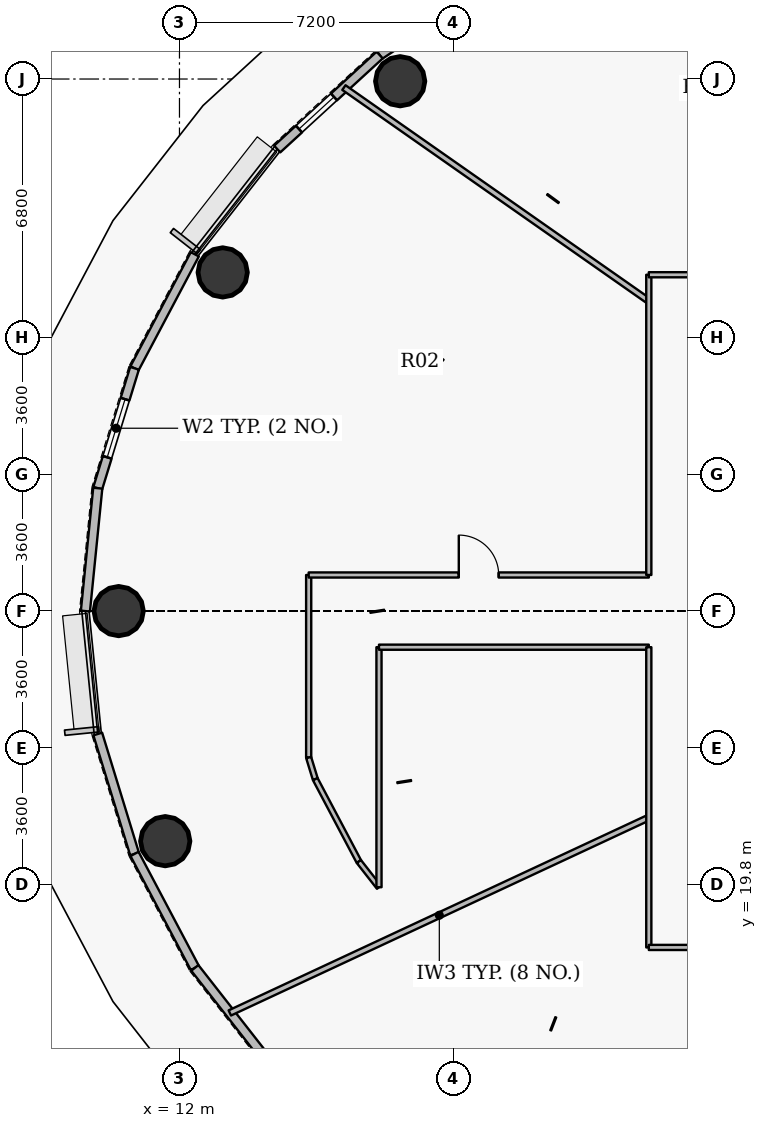
"""IFC4 building model, lengths in metres.
Left out: names, types, materials, properties, quantities, classifications, styles, units other than length and angle.
Written with IfcOpenShell. Run it as: python <this file> out.ifc"""

import sys

from ifc_helpers import new_model, si_unit, direction, frame, frame_2d, origin, origin_2d, place, context, subcontext, project, spatial, rectangle, hollow_circle, extrude, source, transform, mapped, element, fill, save


model = new_model("IFC4")
c1 = context("Model", 3, precision=1e-05, world=origin(), true_north=direction((0.0, 1.0)))
c2 = subcontext(c1, "Body", "Model", "MODEL_VIEW")
j1 = project(units=[si_unit("LENGTHUNIT", "METRE"), si_unit("PLANEANGLEUNIT", "RADIAN")], contexts=[c1])
p1 = place(None, origin())
s1 = spatial("IfcSite", under=j1, at=p1, CompositionType="ELEMENT")
p2 = place(p1, origin())
s2 = spatial("IfcBuilding", under=s1, at=p2, CompositionType="ELEMENT")
p3 = place(p2, frame((0.0, 0.0, 151.35)))
s3 = spatial("IfcBuildingStorey", under=s2, at=p3, CompositionType="ELEMENT", Elevation=151.35)
for number, where, z_axis, x_axis in (
    (1, (17.808, 40.942, -0.3), (0.0, 0.0, 1.0), (1.0, 0.0, 0.0)),
    (2, (13.137, 35.911, -0.3), (0.0, 0.0, 1.0), (1.0, 0.0, 0.0)),
    (3, (10.4, 27.0, -0.3), (0.0, 0.0, 1.0), (1.0, 0.0, 0.0)),
    (4, (11.625, 20.947, -0.3), (0.0, 0.0, 1.0), (1.0, 0.0, 0.0)),
):
    element("IfcColumn", number, at=place(p3, frame(where, z_axis=z_axis, x_axis=x_axis)), inside=s3, PredefinedType="COLUMN", context=c2, shape_type="SweptSolid", body=[
        extrude(hollow_circle(Radius=0.65, WallThickness=0.04, at=origin_2d()), origin(), (0.0, 0.0, 1.0), 5.1),
    ])
p4 = place(p3, frame((17.268, 41.631, 0.0), z_axis=(0.0, 0.0, 1.0), x_axis=(0.831228998277, 0.555930168657, 0.0)))
e5 = element("IfcWall", 5, at=p4, inside=s3, PredefinedType="SOLIDWALL", context=c2, shape_type="SweptSolid", body=[
    extrude(rectangle(XDim=3.8, YDim=0.24, at=frame_2d((1.9, 0.0))), origin(), (0.0, 0.0, 1.0), 4.55),
])
p5 = place(p3, frame((14.572, 39.158, 0.0), z_axis=(0.0, 0.0, 1.0), x_axis=(0.737076565834, 0.675809245349, 0.0)))
e6 = element("IfcWall", 6, at=p5, inside=s3, PredefinedType="SOLIDWALL", context=c2, shape_type="SweptSolid", body=[
    extrude(rectangle(XDim=3.658, YDim=0.24, at=frame_2d((1.829, 0.0))), origin(), (0.0, 0.0, 1.0), 4.55),
])
p6 = place(p5, frame((0.778, 0.0, 0.9)))
e7 = element("IfcOpeningElement", 7, at=p6, cuts=e6, PredefinedType="OPENING", context=c2, shape_type="SweptSolid", body=[
    extrude(rectangle(XDim=1.25, YDim=1.65, at=origin_2d()), frame((0.625, 0.13, 0.825), z_axis=(0.0, -1.0, 0.0), x_axis=(1.0, 0.0, 0.0)), (0.0, 0.0, 1.0), 0.26),
])
p7 = place(p3, frame((10.817, 33.389, 0.0), z_axis=(0.0, 0.0, 1.0), x_axis=(0.467586874938, 0.88394712194, 0.0)))
e8 = element("IfcWall", 8, at=p7, inside=s3, PredefinedType="SOLIDWALL", context=c2, shape_type="SweptSolid", body=[
    extrude(rectangle(XDim=3.393, YDim=0.24, at=frame_2d((1.697, 0.0))), origin(), (0.0, 0.0, 1.0), 4.55),
])
p8 = place(p3, frame((9.85, 30.234, 0.0), z_axis=(0.0, 0.0, 1.0), x_axis=(0.293097995113, 0.956082405058, 0.0)))
e9 = element("IfcWall", 9, at=p8, inside=s3, PredefinedType="SOLIDWALL", context=c2, shape_type="SweptSolid", body=[
    extrude(rectangle(XDim=3.3, YDim=0.24, at=frame_2d((1.65, 0.0))), origin(), (0.0, 0.0, 1.0), 4.55),
])
p9 = place(p8, frame((0.85, 0.0, 0.9)))
e10 = element("IfcOpeningElement", 10, at=p9, cuts=e9, PredefinedType="OPENING", context=c2, shape_type="SweptSolid", body=[
    extrude(rectangle(XDim=1.6, YDim=1.75, at=origin_2d()), frame((0.8, 0.13, 0.875), z_axis=(0.0, -1.0, 0.0), x_axis=(1.0, 0.0, 0.0)), (0.0, 0.0, 1.0), 0.26),
])
p10 = place(p3, frame((9.525, 27.0, 0.0), z_axis=(0.0, 0.0, 1.0), x_axis=(0.100061534614, 0.994981250723, 0.0)))
e11 = element("IfcWall", 11, at=p10, inside=s3, PredefinedType="SOLIDWALL", context=c2, shape_type="SweptSolid", body=[
    extrude(rectangle(XDim=3.25, YDim=0.24, at=frame_2d((1.625, 0.0))), origin(), (0.0, 0.0, 1.0), 4.55),
])
p11 = place(p3, frame((10.817, 20.611, 0.0), z_axis=(0.0, 0.0, 1.0), x_axis=(-0.293097995113, 0.956082405058, 0.0)))
e12 = element("IfcWall", 12, at=p11, inside=s3, PredefinedType="SOLIDWALL", context=c2, shape_type="SweptSolid", body=[
    extrude(rectangle(XDim=3.3, YDim=0.24, at=frame_2d((1.65, 0.0))), origin(), (0.0, 0.0, 1.0), 4.55),
])
p12 = place(p3, frame((12.404, 17.612, 0.0), z_axis=(0.0, 0.0, 1.0), x_axis=(-0.467586874938, 0.88394712194, 0.0)))
e13 = element("IfcWall", 13, at=p12, inside=s3, PredefinedType="SOLIDWALL", context=c2, shape_type="SweptSolid", body=[
    extrude(rectangle(XDim=3.393, YDim=0.24, at=frame_2d((1.697, 0.0))), origin(), (0.0, 0.0, 1.0), 4.55),
])
p13 = place(p3, frame((14.572, 14.842, 0.0), z_axis=(0.0, 0.0, 1.0), x_axis=(-0.616287674549, 0.787521112224, 0.0)))
e14 = element("IfcWall", 14, at=p13, inside=s3, PredefinedType="SOLIDWALL", context=c2, shape_type="SweptSolid", body=[
    extrude(rectangle(XDim=3.517, YDim=0.24, at=frame_2d((1.759, 0.0))), origin(), (0.0, 0.0, 1.0), 4.55),
])
p14 = place(p3, frame((13.325, 16.427, 0.0), z_axis=(0.0, 0.0, 1.0), x_axis=(0.906307691216, 0.42261846723, 0.0)))
e15 = element("IfcWall", 15, at=p14, inside=s3, PredefinedType="PARTITIONING", context=c2, shape_type="SweptSolid", body=[
    extrude(rectangle(XDim=12.165, YDim=0.15, at=frame_2d((6.083, 0.0))), origin(), (0.0, 0.0, 1.0), 3.985),
])
p15 = place(p3, frame((15.4, 23.146, 0.0), z_axis=(0.0, 0.0, 1.0), x_axis=(0.0, 1.0, 0.0)))
e16 = element("IfcWall", 16, at=p15, inside=s3, PredefinedType="PARTITIONING", context=c2, shape_type="SweptSolid", body=[
    extrude(rectangle(XDim=4.804, YDim=0.135, at=frame_2d((2.402, 0.0))), origin(), (0.0, 0.0, 1.0), 3.985),
])
p16 = place(p3, frame((15.4, 23.146, 0.0), z_axis=(0.0, 0.0, 1.0), x_axis=(0.293335154151, -0.956009669061, 0.0)))
e17 = element("IfcWall", 17, at=p16, inside=s3, PredefinedType="PARTITIONING", context=c2, shape_type="SweptSolid", body=[
    extrude(rectangle(XDim=0.594, YDim=0.135, at=frame_2d((0.297, 0.0))), origin(), (0.0, 0.0, 1.0), 4.55),
])
p17 = place(p3, frame((15.4, 27.95, 0.0), z_axis=(0.0, 0.0, 1.0), x_axis=(1.0, 0.0, 0.0)))
e18 = element("IfcWall", 18, at=p17, inside=s3, PredefinedType="PARTITIONING", context=c2, shape_type="SweptSolid", body=[
    extrude(rectangle(XDim=8.95, YDim=0.135, at=frame_2d((4.475, 0.0))), origin(), (0.0, 0.0, 1.0), 4.55),
])
p18 = place(p17, frame((3.95, 0.0, 0.0)))
e19 = element("IfcOpeningElement", 19, at=p18, cuts=e18, PredefinedType="OPENING", context=c2, shape_type="SweptSolid", body=[
    extrude(rectangle(XDim=1.05, YDim=2.15, at=origin_2d()), frame((0.525, 0.078, 1.075), z_axis=(0.0, -1.0, 0.0), x_axis=(1.0, 0.0, 0.0)), (0.0, 0.0, 1.0), 0.155),
])
p19 = place(p3, frame((15.574, 22.578, 0.0), z_axis=(0.0, 0.0, 1.0), x_axis=(0.46757196543, -0.883955008552, 0.0)))
e20 = element("IfcWall", 20, at=p19, inside=s3, PredefinedType="PARTITIONING", context=c2, shape_type="SweptSolid", body=[
    extrude(rectangle(XDim=2.451, YDim=0.135, at=frame_2d((1.226, 0.0))), origin(), (0.0, 0.0, 1.0), 3.985),
])
p20 = place(p3, frame((16.327, 40.775, 0.0), z_axis=(0.0, 0.0, 1.0), x_axis=(0.81915813363, -0.573567739773, 0.0)))
e21 = element("IfcWall", 21, at=p20, inside=s3, PredefinedType="PARTITIONING", context=c2, shape_type="SweptSolid", body=[
    extrude(rectangle(XDim=9.794, YDim=0.15, at=frame_2d((4.897, 0.0))), origin(), (0.0, 0.0, 1.0), 3.985),
])
p21 = place(p3, frame((16.72, 20.411, 0.0), z_axis=(0.0, 0.0, 1.0), x_axis=(0.616377221056, -0.787451027914, 0.0)))
e22 = element("IfcWall", 22, at=p21, inside=s3, PredefinedType="PARTITIONING", context=c2, shape_type="SweptSolid", body=[
    extrude(rectangle(XDim=0.859, YDim=0.135, at=frame_2d((0.43, 0.0))), origin(), (0.0, 0.0, 1.0), 4.55),
])
p22 = place(p3, frame((17.25, 19.734, 0.0), z_axis=(0.0, 0.0, 1.0), x_axis=(0.0, 1.0, 0.0)))
e23 = element("IfcWall", 23, at=p22, inside=s3, PredefinedType="PARTITIONING", context=c2, shape_type="SweptSolid", body=[
    extrude(rectangle(XDim=6.316, YDim=0.135, at=frame_2d((3.158, 0.0))), origin(), (0.0, 0.0, 1.0), 3.985),
])
p23 = place(p3, frame((17.25, 26.05, 0.0), z_axis=(0.0, 0.0, 1.0), x_axis=(1.0, 0.0, 0.0)))
e24 = element("IfcWall", 24, at=p23, inside=s3, PredefinedType="PARTITIONING", context=c2, shape_type="SweptSolid", body=[
    extrude(rectangle(XDim=7.1, YDim=0.135, at=frame_2d((3.55, 0.0))), origin(), (0.0, 0.0, 1.0), 4.035),
])
p24 = place(p3, frame((24.35, 18.15, 0.0), z_axis=(0.0, 0.0, 1.0), x_axis=(0.0, 1.0, 0.0)))
e25 = element("IfcWall", 25, at=p24, inside=s3, PredefinedType="PARTITIONING", context=c2, shape_type="SweptSolid", body=[
    extrude(rectangle(XDim=7.9, YDim=0.135, at=frame_2d((3.95, 0.0))), origin(), (0.0, 0.0, 1.0), 3.985),
])
p25 = place(p3, frame((24.35, 18.15, 0.0), z_axis=(0.0, 0.0, 1.0), x_axis=(1.0, 0.0, 0.0)))
e26 = element("IfcWall", 26, at=p25, inside=s3, PredefinedType="PARTITIONING", context=c2, shape_type="SweptSolid", body=[
    extrude(rectangle(XDim=23.85, YDim=0.135, at=frame_2d((11.925, 0.0))), origin(), (0.0, 0.0, 1.0), 3.985),
])
p26 = place(p25, frame((6.931, 0.0, 0.0)))
e27 = element("IfcOpeningElement", 27, at=p26, cuts=e26, PredefinedType="OPENING", context=c2, shape_type="SweptSolid", body=[
    extrude(rectangle(XDim=1.05, YDim=2.15, at=origin_2d()), frame((0.525, 0.078, 1.075), z_axis=(0.0, -1.0, 0.0), x_axis=(1.0, 0.0, 0.0)), (0.0, 0.0, 1.0), 0.155),
])
p27 = place(p25, frame((15.835, 0.0, 0.0)))
e28 = element("IfcOpeningElement", 28, at=p27, cuts=e26, PredefinedType="OPENING", context=c2, shape_type="SweptSolid", body=[
    extrude(rectangle(XDim=0.82, YDim=2.1, at=origin_2d()), frame((0.41, 0.078, 1.05), z_axis=(0.0, -1.0, 0.0), x_axis=(1.0, 0.0, 0.0)), (0.0, 0.0, 1.0), 0.155),
])
p28 = place(p25, frame((19.139, 0.0, 0.0)))
e29 = element("IfcOpeningElement", 29, at=p28, cuts=e26, PredefinedType="OPENING", context=c2, shape_type="SweptSolid", body=[
    extrude(rectangle(XDim=0.82, YDim=2.1, at=origin_2d()), frame((0.41, 0.078, 1.05), z_axis=(0.0, -1.0, 0.0), x_axis=(1.0, 0.0, 0.0)), (0.0, 0.0, 1.0), 0.155),
])
p29 = place(p25, frame((22.802, 0.0, 0.0)))
e30 = element("IfcOpeningElement", 30, at=p29, cuts=e26, PredefinedType="OPENING", context=c2, shape_type="SweptSolid", body=[
    extrude(rectangle(XDim=0.82, YDim=2.1, at=origin_2d()), frame((0.41, 0.078, 1.05), z_axis=(0.0, -1.0, 0.0), x_axis=(1.0, 0.0, 0.0)), (0.0, 0.0, 1.0), 0.155),
])
p30 = place(p3, frame((24.35, 27.95, 0.0), z_axis=(0.0, 0.0, 1.0), x_axis=(0.0, 1.0, 0.0)))
e31 = element("IfcWall", 31, at=p30, inside=s3, PredefinedType="PARTITIONING", context=c2, shape_type="SweptSolid", body=[
    extrude(rectangle(XDim=7.9, YDim=0.135, at=frame_2d((3.95, 0.0))), origin(), (0.0, 0.0, 1.0), 3.985),
])
p31 = place(p3, frame((24.35, 35.85, 0.0), z_axis=(0.0, 0.0, 1.0), x_axis=(1.0, 0.0, 0.0)))
e32 = element("IfcWall", 32, at=p31, inside=s3, PredefinedType="PARTITIONING", context=c2, shape_type="SweptSolid", body=[
    extrude(rectangle(XDim=29.104, YDim=0.135, at=frame_2d((14.552, 0.0))), origin(), (0.0, 0.0, 1.0), 3.985),
])
p32 = place(p31, frame((19.445, 0.0, 0.0)))
e33 = element("IfcOpeningElement", 33, at=p32, cuts=e32, PredefinedType="OPENING", context=c2, shape_type="SweptSolid", body=[
    extrude(rectangle(XDim=1.05, YDim=2.15, at=origin_2d()), frame((0.525, 0.078, 1.075), z_axis=(0.0, -1.0, 0.0), x_axis=(1.0, 0.0, 0.0)), (0.0, 0.0, 1.0), 0.155),
])
p33 = place(p31, frame((4.933, 0.0, 0.0)))
e34 = element("IfcOpeningElement", 34, at=p33, cuts=e32, PredefinedType="OPENING", context=c2, shape_type="SweptSolid", body=[
    extrude(rectangle(XDim=1.05, YDim=2.15, at=origin_2d()), frame((0.525, 0.078, 1.075), z_axis=(0.0, -1.0, 0.0), x_axis=(1.0, 0.0, 0.0)), (0.0, 0.0, 1.0), 0.155),
])
m1 = source(origin(), c2, "Body", "SweptSolid", [
    extrude(rectangle(XDim=1.25, YDim=1.65, at=origin_2d()), frame((0.625, 0.03, 0.825), z_axis=(0.0, -1.0, 0.0), x_axis=(1.0, 0.0, 0.0)), (0.0, 0.0, 1.0), 0.06),
])
p34 = place(p6, origin())
e35 = element("IfcWindow", 35, at=p34, inside=s3, PartitioningType="SINGLE_PANEL", PredefinedType="WINDOW", context=c2, shape_type="MappedRepresentation", body=[
    mapped(m1, transform((0.0, 0.0, 0.0), x_axis=(1.0, 0.0, 0.0), y_axis=(0.0, 1.0, 0.0), z_axis=(0.0, 0.0, 1.0), scale=1.0)),
])
fill(e7, e35)
m2 = source(origin(), c2, "Body", "SweptSolid", [
    extrude(rectangle(XDim=1.6, YDim=1.75, at=origin_2d()), frame((0.8, 0.03, 0.875), z_axis=(0.0, -1.0, 0.0), x_axis=(1.0, 0.0, 0.0)), (0.0, 0.0, 1.0), 0.06),
])
p35 = place(p9, origin())
e36 = element("IfcWindow", 36, at=p35, inside=s3, PartitioningType="DOUBLE_PANEL_VERTICAL", PredefinedType="WINDOW", context=c2, shape_type="MappedRepresentation", body=[
    mapped(m2, transform((0.0, 0.0, 0.0), x_axis=(1.0, 0.0, 0.0), y_axis=(0.0, 1.0, 0.0), z_axis=(0.0, 0.0, 1.0), scale=1.0)),
])
fill(e10, e36)
m3 = source(origin(), c2, "Body", "SweptSolid", [
    extrude(rectangle(XDim=1.05, YDim=2.15, at=origin_2d()), frame((0.525, 0.025, 1.075), z_axis=(0.0, -1.0, 0.0), x_axis=(1.0, 0.0, 0.0)), (0.0, 0.0, 1.0), 0.05),
])
p36 = place(p18, origin())
e37 = element("IfcDoor", 37, at=p36, inside=s3, OperationType="SINGLE_SWING_LEFT", PredefinedType="DOOR", context=c2, shape_type="MappedRepresentation", body=[
    mapped(m3, transform((0.0, 0.0, 0.0), x_axis=(1.0, 0.0, 0.0), y_axis=(0.0, 1.0, 0.0), z_axis=(0.0, 0.0, 1.0), scale=1.0)),
])
fill(e19, e37)
save(model, sys.argv[1])
